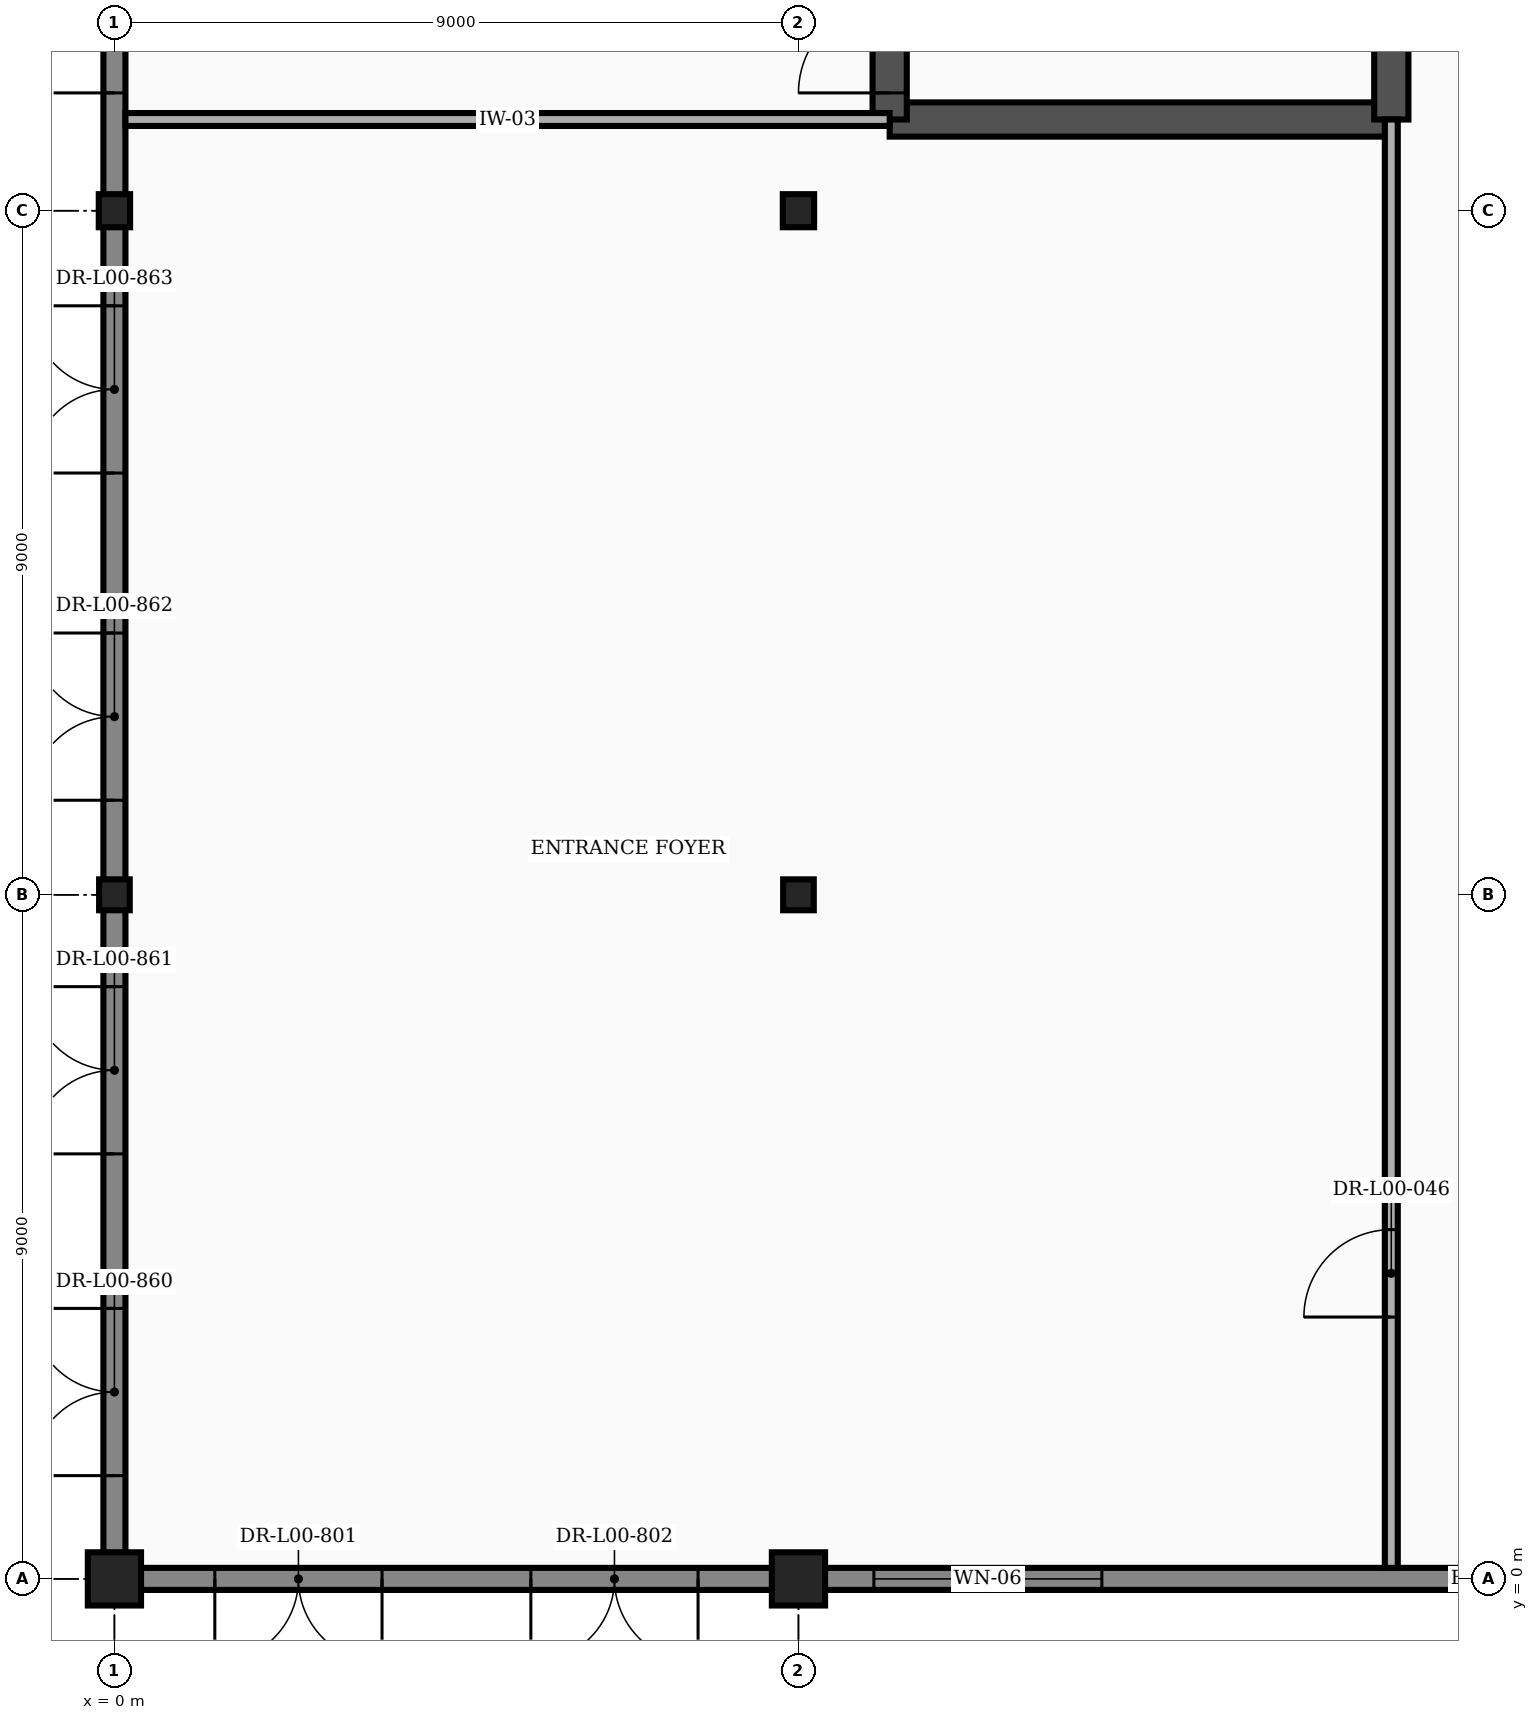
"""IFC4 building model, lengths in metres.
Left out: names, types, materials, properties, quantities, classifications, styles, units other than length and angle.
Written with IfcOpenShell. Run it as: python <this file> out.ifc"""

import sys

from ifc_helpers import new_model, si_unit, direction, frame, frame_2d, origin, origin_with_axes, origin_2d, place, context, subcontext, project, spatial, rectangle, i_section, extrude, element, fill, save


model = new_model("IFC4")
c1 = context("Model", 3, precision=1e-05, world=origin(), true_north=direction((0.0, 1.0)))
c2 = subcontext(c1, "Body", "Model", "MODEL_VIEW")
j1 = project(units=[si_unit("LENGTHUNIT", "METRE"), si_unit("PLANEANGLEUNIT", "RADIAN")], contexts=[c1])
p1 = place(None, origin())
s1 = spatial("IfcSite", under=j1, at=p1, CompositionType="ELEMENT")
p2 = place(p1, origin())
s2 = spatial("IfcBuilding", under=s1, at=p2, CompositionType="ELEMENT")
p3 = place(p2, origin())
s3 = spatial("IfcBuildingStorey", under=s2, at=p3, CompositionType="ELEMENT", Elevation=0.0)
p4 = place(p3, origin_with_axes())
e1 = element("IfcColumn", 1, at=p4, inside=s3, PredefinedType="COLUMN", context=c2, shape_type="SweptSolid", body=[
    extrude(rectangle(XDim=0.7, YDim=0.7, at=origin_2d()), origin(), (0.0, 0.0, 1.0), 6.0),
])
p5 = place(p3, frame((0.0, 9.0, 0.0), z_axis=(0.0, 0.0, 1.0), x_axis=(1.0, 0.0, 0.0)))
e2 = element("IfcColumn", 2, at=p5, inside=s3, PredefinedType="COLUMN", context=c2, shape_type="SweptSolid", body=[
    extrude(i_section(OverallWidth=0.403, OverallDepth=0.406, WebThickness=0.027, FlangeThickness=0.043, at=origin_2d()), origin(), (0.0, 0.0, 1.0), 6.0),
])
p6 = place(p3, frame((0.0, 18.0, 0.0), z_axis=(0.0, 0.0, 1.0), x_axis=(1.0, 0.0, 0.0)))
e3 = element("IfcColumn", 3, at=p6, inside=s3, PredefinedType="COLUMN", context=c2, shape_type="SweptSolid", body=[
    extrude(i_section(OverallWidth=0.412, OverallDepth=0.435, WebThickness=0.036, FlangeThickness=0.058, at=origin_2d()), origin(), (0.0, 0.0, 1.0), 6.0),
])
p7 = place(p3, frame((9.0, 0.0, 0.0), z_axis=(0.0, 0.0, 1.0), x_axis=(1.0, 0.0, 0.0)))
e4 = element("IfcColumn", 4, at=p7, inside=s3, PredefinedType="COLUMN", context=c2, shape_type="SweptSolid", body=[
    extrude(rectangle(XDim=0.7, YDim=0.7, at=origin_2d()), origin(), (0.0, 0.0, 1.0), 6.0),
])
p8 = place(p3, frame((9.0, 9.0, 0.0), z_axis=(0.0, 0.0, 1.0), x_axis=(1.0, 0.0, 0.0)))
e5 = element("IfcColumn", 5, at=p8, inside=s3, PredefinedType="COLUMN", context=c2, shape_type="SweptSolid", body=[
    extrude(i_section(OverallWidth=0.403, OverallDepth=0.406, WebThickness=0.027, FlangeThickness=0.043, at=origin_2d()), origin(), (0.0, 0.0, 1.0), 6.0),
])
p9 = place(p3, frame((9.0, 18.0, 0.0), z_axis=(0.0, 0.0, 1.0), x_axis=(1.0, 0.0, 0.0)))
e6 = element("IfcColumn", 6, at=p9, inside=s3, PredefinedType="COLUMN", context=c2, shape_type="SweptSolid", body=[
    extrude(i_section(OverallWidth=0.412, OverallDepth=0.435, WebThickness=0.036, FlangeThickness=0.058, at=origin_2d()), origin(), (0.0, 0.0, 1.0), 6.0),
])
p10 = place(p3, frame((0.342, 0.0, 0.0), z_axis=(0.0, 0.0, 1.0), x_axis=(1.0, 0.0, 0.0)))
e7 = element("IfcWall", 7, at=p10, inside=s3, PredefinedType="STANDARD", context=c2, shape_type="SweptSolid", body=[
    extrude(rectangle(XDim=8.316, YDim=0.29, at=frame_2d((4.158, 0.0))), origin(), (0.0, 0.0, 1.0), 5.138),
])
p11 = place(p10, frame((0.979, 0.0, 0.0)))
e8 = element("IfcOpeningElement", 8, at=p11, cuts=e7, PredefinedType="OPENING", context=c2, shape_type="SweptSolid", body=[
    extrude(rectangle(XDim=2.2, YDim=2.4, at=frame_2d((1.1, 1.2))), frame((0.0, 0.157, 0.0), z_axis=(0.0, -1.0, 0.0), x_axis=(1.0, 0.0, 0.0)), (0.0, 0.0, 1.0), 0.314),
])
p12 = place(p10, frame((5.137, 0.0, 0.0)))
e9 = element("IfcOpeningElement", 9, at=p12, cuts=e7, PredefinedType="OPENING", context=c2, shape_type="SweptSolid", body=[
    extrude(rectangle(XDim=2.2, YDim=2.4, at=frame_2d((1.1, 1.2))), frame((0.0, 0.157, 0.0), z_axis=(0.0, -1.0, 0.0), x_axis=(1.0, 0.0, 0.0)), (0.0, 0.0, 1.0), 0.314),
])
p13 = place(p3, frame((9.342, 0.0, 0.0), z_axis=(0.0, 0.0, 1.0), x_axis=(1.0, 0.0, 0.0)))
e10 = element("IfcWall", 10, at=p13, inside=s3, PredefinedType="STANDARD", context=c2, shape_type="SweptSolid", body=[
    extrude(rectangle(XDim=17.316, YDim=0.29, at=frame_2d((8.658, 0.0))), origin(), (0.0, 0.0, 1.0), 4.988),
])
p14 = place(p13, frame((11.458, 0.0, 0.0)))
e11 = element("IfcOpeningElement", 11, at=p14, cuts=e10, PredefinedType="OPENING", context=c2, shape_type="SweptSolid", body=[
    extrude(rectangle(XDim=1.2, YDim=2.2, at=frame_2d((0.6, 1.1))), frame((0.0, 0.157, 0.0), z_axis=(0.0, -1.0, 0.0), x_axis=(1.0, 0.0, 0.0)), (0.0, 0.0, 1.0), 0.314),
])
p15 = place(p13, frame((14.358, 0.0, 0.0)))
e12 = element("IfcOpeningElement", 12, at=p15, cuts=e10, PredefinedType="OPENING", context=c2, shape_type="SweptSolid", body=[
    extrude(rectangle(XDim=2.4, YDim=2.4, at=frame_2d((1.2, 1.2))), frame((0.0, 0.157, 0.0), z_axis=(0.0, -1.0, 0.0), x_axis=(1.0, 0.0, 0.0)), (0.0, 0.0, 1.0), 0.314),
])
p16 = place(p13, frame((0.65, 0.0, 0.85)))
e13 = element("IfcOpeningElement", 13, at=p16, cuts=e10, PredefinedType="OPENING", context=c2, shape_type="SweptSolid", body=[
    extrude(rectangle(XDim=3.0, YDim=2.6, at=frame_2d((1.5, 1.3))), frame((0.0, 0.157, 0.0), z_axis=(0.0, -1.0, 0.0), x_axis=(1.0, 0.0, 0.0)), (0.0, 0.0, 1.0), 0.314),
])
p17 = place(p3, frame((0.0, 0.342, 0.0), z_axis=(0.0, 0.0, 1.0), x_axis=(0.0, 1.0, 0.0)))
e14 = element("IfcWall", 14, at=p17, inside=s3, PredefinedType="STANDARD", context=c2, shape_type="SweptSolid", body=[
    extrude(rectangle(XDim=8.466, YDim=0.29, at=frame_2d((4.233, 0.0))), origin(), (0.0, 0.0, 1.0), 5.217),
])
p18 = place(p17, frame((1.017, 0.0, 0.0)))
e15 = element("IfcOpeningElement", 15, at=p18, cuts=e14, PredefinedType="OPENING", context=c2, shape_type="SweptSolid", body=[
    extrude(rectangle(XDim=2.2, YDim=2.4, at=frame_2d((1.1, 1.2))), frame((0.0, 0.157, 0.0), z_axis=(0.0, -1.0, 0.0), x_axis=(1.0, 0.0, 0.0)), (0.0, 0.0, 1.0), 0.314),
])
p19 = place(p17, frame((5.25, 0.0, 0.0)))
e16 = element("IfcOpeningElement", 16, at=p19, cuts=e14, PredefinedType="OPENING", context=c2, shape_type="SweptSolid", body=[
    extrude(rectangle(XDim=2.2, YDim=2.4, at=frame_2d((1.1, 1.2))), frame((0.0, 0.157, 0.0), z_axis=(0.0, -1.0, 0.0), x_axis=(1.0, 0.0, 0.0)), (0.0, 0.0, 1.0), 0.314),
])
p20 = place(p3, frame((0.0, 9.192, 0.0), z_axis=(0.0, 0.0, 1.0), x_axis=(0.0, 1.0, 0.0)))
e17 = element("IfcWall", 17, at=p20, inside=s3, PredefinedType="STANDARD", context=c2, shape_type="SweptSolid", body=[
    extrude(rectangle(XDim=8.61, YDim=0.29, at=frame_2d((4.305, 0.0))), origin(), (0.0, 0.0, 1.0), 5.217),
])
p21 = place(p20, frame((1.052, 0.0, 0.0)))
e18 = element("IfcOpeningElement", 18, at=p21, cuts=e17, PredefinedType="OPENING", context=c2, shape_type="SweptSolid", body=[
    extrude(rectangle(XDim=2.2, YDim=2.4, at=frame_2d((1.1, 1.2))), frame((0.0, 0.157, 0.0), z_axis=(0.0, -1.0, 0.0), x_axis=(1.0, 0.0, 0.0)), (0.0, 0.0, 1.0), 0.314),
])
p22 = place(p20, frame((5.357, 0.0, 0.0)))
e19 = element("IfcOpeningElement", 19, at=p22, cuts=e17, PredefinedType="OPENING", context=c2, shape_type="SweptSolid", body=[
    extrude(rectangle(XDim=2.2, YDim=2.4, at=frame_2d((1.1, 1.2))), frame((0.0, 0.157, 0.0), z_axis=(0.0, -1.0, 0.0), x_axis=(1.0, 0.0, 0.0)), (0.0, 0.0, 1.0), 0.314),
])
p23 = place(p3, frame((0.0, 18.198, 0.0), z_axis=(0.0, 0.0, 1.0), x_axis=(0.0, 1.0, 0.0)))
e20 = element("IfcWall", 20, at=p23, inside=s3, PredefinedType="STANDARD", context=c2, shape_type="SweptSolid", body=[
    extrude(rectangle(XDim=17.603, YDim=0.29, at=frame_2d((8.802, 0.0))), origin(), (0.0, 0.0, 1.0), 5.066),
])
p24 = place(p23, frame((1.352, 0.0, 0.0)))
e21 = element("IfcOpeningElement", 21, at=p24, cuts=e20, PredefinedType="OPENING", context=c2, shape_type="SweptSolid", body=[
    extrude(rectangle(XDim=3.5, YDim=2.4, at=frame_2d((1.75, 1.2))), frame((0.0, 0.157, 0.0), z_axis=(0.0, -1.0, 0.0), x_axis=(1.0, 0.0, 0.0)), (0.0, 0.0, 1.0), 0.314),
])
p25 = place(p23, frame((7.302, 0.0, 0.85)))
e22 = element("IfcOpeningElement", 22, at=p25, cuts=e20, PredefinedType="OPENING", context=c2, shape_type="SweptSolid", body=[
    extrude(rectangle(XDim=3.0, YDim=2.6, at=frame_2d((1.5, 1.3))), frame((0.0, 0.157, 0.0), z_axis=(0.0, -1.0, 0.0), x_axis=(1.0, 0.0, 0.0)), (0.0, 0.0, 1.0), 0.314),
])
p26 = place(p3, frame((10.2, 19.2, 0.0), z_axis=(0.0, 0.0, 1.0), x_axis=(1.0, 0.0, 0.0)))
e23 = element("IfcWall", 23, at=p26, inside=s3, PredefinedType="SHEAR", context=c2, shape_type="SweptSolid", body=[
    extrude(rectangle(XDim=6.6, YDim=0.45, at=frame_2d((3.3, 0.0))), origin(), (0.0, 0.0, 1.0), 5.75),
])
p27 = place(p3, frame((10.2, 19.2, 0.0), z_axis=(0.0, 0.0, 1.0), x_axis=(0.0, 1.0, 0.0)))
e24 = element("IfcWall", 24, at=p27, inside=s3, PredefinedType="SHEAR", context=c2, shape_type="SweptSolid", body=[
    extrude(rectangle(XDim=15.6, YDim=0.45, at=frame_2d((7.8, 0.0))), origin(), (0.0, 0.0, 1.0), 5.75),
])
p28 = place(p27, frame((0.35, 0.0, 0.0)))
e25 = element("IfcOpeningElement", 25, at=p28, cuts=e24, PredefinedType="OPENING", context=c2, shape_type="SweptSolid", body=[
    extrude(rectangle(XDim=2.4, YDim=2.25, at=frame_2d((1.2, 1.125))), frame((0.0, 0.237, 0.0), z_axis=(0.0, -1.0, 0.0), x_axis=(1.0, 0.0, 0.0)), (0.0, 0.0, 1.0), 0.474),
])
p29 = place(p3, frame((16.8, 19.2, 0.0), z_axis=(0.0, 0.0, 1.0), x_axis=(0.0, 1.0, 0.0)))
e26 = element("IfcWall", 26, at=p29, inside=s3, PredefinedType="SHEAR", context=c2, shape_type="SweptSolid", body=[
    extrude(rectangle(XDim=9.585, YDim=0.45, at=frame_2d((4.792, 0.0))), origin(), (0.0, 0.0, 1.0), 5.75),
])
p30 = place(p3, frame((0.145, 19.2, 0.0), z_axis=(0.0, 0.0, 1.0), x_axis=(1.0, 0.0, 0.0)))
e27 = element("IfcWall", 27, at=p30, inside=s3, PredefinedType="PARTITIONING", context=c2, shape_type="SweptSolid", body=[
    extrude(rectangle(XDim=10.055, YDim=0.17, at=frame_2d((5.027, 0.0))), origin(), (0.0, 0.0, 1.0), 5.75),
])
p31 = place(p3, frame((16.8, 0.145, 0.0), z_axis=(0.0, 0.0, 1.0), x_axis=(0.0, 1.0, 0.0)))
e28 = element("IfcWall", 28, at=p31, inside=s3, PredefinedType="PARTITIONING", context=c2, shape_type="SweptSolid", body=[
    extrude(rectangle(XDim=19.055, YDim=0.17, at=frame_2d((9.527, 0.0))), origin(), (0.0, 0.0, 1.0), 5.75),
])
p32 = place(p31, frame((3.3, 0.0, 0.0)))
e29 = element("IfcOpeningElement", 29, at=p32, cuts=e28, PredefinedType="OPENING", context=c2, shape_type="SweptSolid", body=[
    extrude(rectangle(XDim=1.15, YDim=2.15, at=frame_2d((0.575, 1.075))), frame((0.0, 0.097, 0.0), z_axis=(0.0, -1.0, 0.0), x_axis=(1.0, 0.0, 0.0)), (0.0, 0.0, 1.0), 0.194),
])
p33 = place(p11, frame((2.2, 0.0, 0.0), z_axis=(0.0, 0.0, 1.0), x_axis=(-1.0, 0.0, 0.0)))
e30 = element("IfcDoor", 30, at=p33, inside=s3, OperationType="DOUBLE_DOOR_SINGLE_SWING", PredefinedType="DOOR", context=c2, shape_type="SweptSolid", body=[
    extrude(rectangle(XDim=2.2, YDim=2.4, at=frame_2d((1.1, 1.2))), frame((0.0, 0.025, 0.0), z_axis=(0.0, -1.0, 0.0), x_axis=(1.0, 0.0, 0.0)), (0.0, 0.0, 1.0), 0.05),
])
fill(e8, e30)
p34 = place(p12, frame((2.2, 0.0, 0.0), z_axis=(0.0, 0.0, 1.0), x_axis=(-1.0, 0.0, 0.0)))
e31 = element("IfcDoor", 31, at=p34, inside=s3, OperationType="DOUBLE_DOOR_SINGLE_SWING", PredefinedType="DOOR", context=c2, shape_type="SweptSolid", body=[
    extrude(rectangle(XDim=2.2, YDim=2.4, at=frame_2d((1.1, 1.2))), frame((0.0, 0.025, 0.0), z_axis=(0.0, -1.0, 0.0), x_axis=(1.0, 0.0, 0.0)), (0.0, 0.0, 1.0), 0.05),
])
fill(e9, e31)
p35 = place(p16, origin())
e32 = element("IfcWindow", 32, at=p35, inside=s3, PartitioningType="SINGLE_PANEL", PredefinedType="WINDOW", context=c2, shape_type="SweptSolid", body=[
    extrude(rectangle(XDim=3.0, YDim=2.6, at=frame_2d((1.5, 1.3))), frame((0.0, 0.03, 0.0), z_axis=(0.0, -1.0, 0.0), x_axis=(1.0, 0.0, 0.0)), (0.0, 0.0, 1.0), 0.06),
])
fill(e13, e32)
p36 = place(p18, origin())
e33 = element("IfcDoor", 33, at=p36, inside=s3, OperationType="DOUBLE_DOOR_SINGLE_SWING", PredefinedType="DOOR", context=c2, shape_type="SweptSolid", body=[
    extrude(rectangle(XDim=2.2, YDim=2.4, at=frame_2d((1.1, 1.2))), frame((0.0, 0.025, 0.0), z_axis=(0.0, -1.0, 0.0), x_axis=(1.0, 0.0, 0.0)), (0.0, 0.0, 1.0), 0.05),
])
fill(e15, e33)
p37 = place(p19, origin())
e34 = element("IfcDoor", 34, at=p37, inside=s3, OperationType="DOUBLE_DOOR_SINGLE_SWING", PredefinedType="DOOR", context=c2, shape_type="SweptSolid", body=[
    extrude(rectangle(XDim=2.2, YDim=2.4, at=frame_2d((1.1, 1.2))), frame((0.0, 0.025, 0.0), z_axis=(0.0, -1.0, 0.0), x_axis=(1.0, 0.0, 0.0)), (0.0, 0.0, 1.0), 0.05),
])
fill(e16, e34)
p38 = place(p21, origin())
e35 = element("IfcDoor", 35, at=p38, inside=s3, OperationType="DOUBLE_DOOR_SINGLE_SWING", PredefinedType="DOOR", context=c2, shape_type="SweptSolid", body=[
    extrude(rectangle(XDim=2.2, YDim=2.4, at=frame_2d((1.1, 1.2))), frame((0.0, 0.025, 0.0), z_axis=(0.0, -1.0, 0.0), x_axis=(1.0, 0.0, 0.0)), (0.0, 0.0, 1.0), 0.05),
])
fill(e18, e35)
p39 = place(p22, origin())
e36 = element("IfcDoor", 36, at=p39, inside=s3, OperationType="DOUBLE_DOOR_SINGLE_SWING", PredefinedType="DOOR", context=c2, shape_type="SweptSolid", body=[
    extrude(rectangle(XDim=2.2, YDim=2.4, at=frame_2d((1.1, 1.2))), frame((0.0, 0.025, 0.0), z_axis=(0.0, -1.0, 0.0), x_axis=(1.0, 0.0, 0.0)), (0.0, 0.0, 1.0), 0.05),
])
fill(e19, e36)
p40 = place(p24, origin())
e37 = element("IfcDoor", 37, at=p40, inside=s3, OperationType="DOUBLE_DOOR_SINGLE_SWING", PredefinedType="DOOR", context=c2, shape_type="SweptSolid", body=[
    extrude(rectangle(XDim=3.5, YDim=2.4, at=frame_2d((1.75, 1.2))), frame((0.0, 0.025, 0.0), z_axis=(0.0, -1.0, 0.0), x_axis=(1.0, 0.0, 0.0)), (0.0, 0.0, 1.0), 0.05),
])
fill(e21, e37)
p41 = place(p28, origin())
e38 = element("IfcDoor", 38, at=p41, inside=s3, OperationType="DOUBLE_DOOR_SINGLE_SWING", PredefinedType="DOOR", context=c2, shape_type="SweptSolid", body=[
    extrude(rectangle(XDim=2.4, YDim=2.25, at=frame_2d((1.2, 1.125))), frame((0.0, 0.025, 0.0), z_axis=(0.0, -1.0, 0.0), x_axis=(1.0, 0.0, 0.0)), (0.0, 0.0, 1.0), 0.05),
])
fill(e25, e38)
p42 = place(p32, origin())
e39 = element("IfcDoor", 39, at=p42, inside=s3, OperationType="SINGLE_SWING_LEFT", PredefinedType="DOOR", context=c2, shape_type="SweptSolid", body=[
    extrude(rectangle(XDim=1.15, YDim=2.15, at=frame_2d((0.575, 1.075))), frame((0.0, 0.025, 0.0), z_axis=(0.0, -1.0, 0.0), x_axis=(1.0, 0.0, 0.0)), (0.0, 0.0, 1.0), 0.05),
])
fill(e29, e39)
save(model, sys.argv[1])
